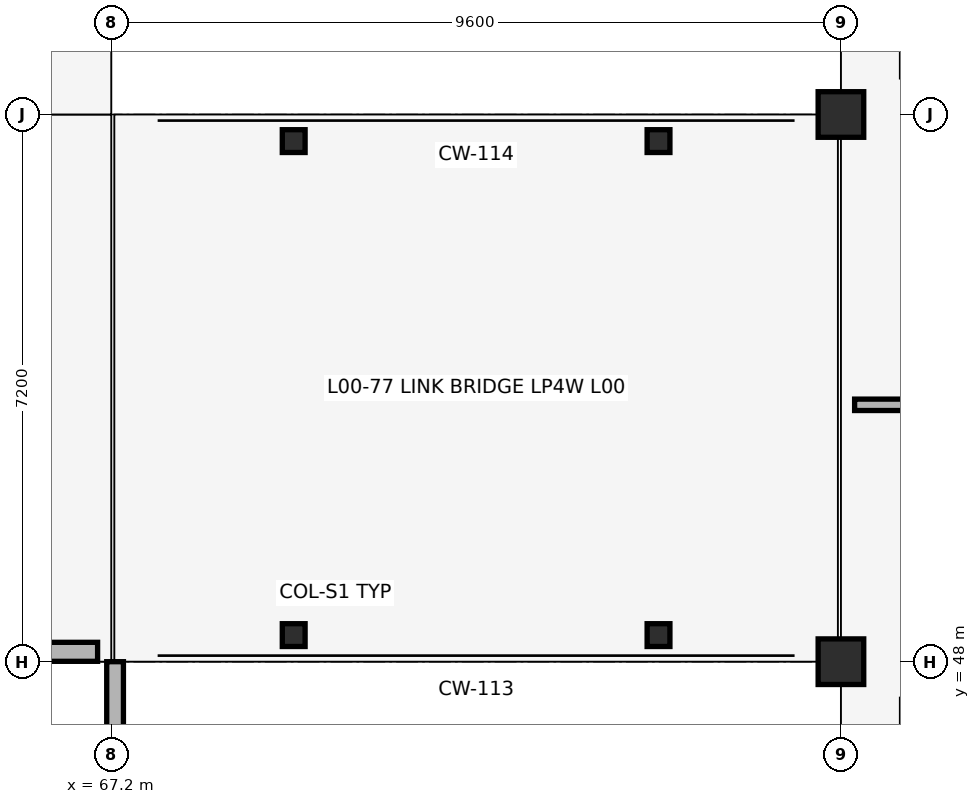
"""IFC4 building model, lengths in metres.
Left out: names, types, materials, properties, quantities, classifications, styles, units other than length and angle.
Written with IfcOpenShell. Run it as: python <this file> out.ifc"""

import sys

from ifc_helpers import new_model, si_unit, direction, frame, frame_2d, origin, origin_2d, place, context, subcontext, project, spatial, rectangle, circle, i_section, extrude, element, save


model = new_model("IFC4")
c1 = context("Model", 3, precision=1e-05, world=origin(), true_north=direction((0.0, 1.0)))
c2 = subcontext(c1, "Body", "Model", "MODEL_VIEW")
j1 = project(units=[si_unit("LENGTHUNIT", "METRE"), si_unit("PLANEANGLEUNIT", "RADIAN")], contexts=[c1])
p1 = place(None, origin())
s1 = spatial("IfcSite", under=j1, at=p1, CompositionType="ELEMENT")
p2 = place(p1, origin())
s2 = spatial("IfcBuilding", under=s1, at=p2, CompositionType="ELEMENT")
p3 = place(p2, origin())
s3 = spatial("IfcBuildingStorey", under=s2, at=p3, CompositionType="ELEMENT", Elevation=0.0)
for number, where, z_axis, x_axis in (
    (1, (69.6, 48.35, -0.44), (0.0, 0.0, 1.0), (1.0, 0.0, 0.0)),
    (2, (69.6, 54.85, -0.44), (0.0, 0.0, 1.0), (1.0, 0.0, 0.0)),
    (3, (74.4, 48.35, -0.44), (0.0, 0.0, 1.0), (1.0, 0.0, 0.0)),
    (4, (74.4, 54.85, -0.44), (0.0, 0.0, 1.0), (1.0, 0.0, 0.0)),
):
    element("IfcColumn", number, at=place(p3, frame(where, z_axis=z_axis, x_axis=x_axis)), inside=s3, PredefinedType="COLUMN", context=c2, shape_type="SweptSolid", body=[
        extrude(i_section(OverallWidth=0.3, OverallDepth=0.3, WebThickness=0.011, FlangeThickness=0.019, FilletRadius=0.027, at=origin_2d()), origin(), (0.0, 0.0, 1.0), 4.86),
    ])
for number, where, z_axis, x_axis in (
    (5, (76.8, 48.0, -0.44), (0.0, 0.0, 1.0), (1.0, 0.0, 0.0)),
    (6, (76.8, 55.2, -0.44), (0.0, 0.0, 1.0), (1.0, 0.0, 0.0)),
):
    element("IfcColumn", number, at=place(p3, frame(where, z_axis=z_axis, x_axis=x_axis)), inside=s3, PredefinedType="COLUMN", context=c2, shape_type="SweptSolid", body=[
        extrude(circle(Radius=0.3, at=origin_2d()), origin(), (0.0, 0.0, 1.0), 4.86),
    ])
p4 = place(p3, frame((57.68, 48.13, 0.0), z_axis=(0.0, 0.0, 1.0), x_axis=(1.0, 0.0, 0.0)))
e7 = element("IfcWall", 7, at=p4, inside=s3, PredefinedType="PARAPET", context=c2, shape_type="SweptSolid", body=[
    extrude(rectangle(XDim=9.34, YDim=0.25, at=frame_2d((4.67, 0.0))), origin(), (0.0, 0.0, 1.0), 1.12),
])
p5 = place(p3, frame((67.25, 7.2, 0.0), z_axis=(0.0, 0.0, 1.0), x_axis=(0.0, 1.0, 0.0)))
e8 = element("IfcWall", 8, at=p5, inside=s3, PredefinedType="PARAPET", context=c2, shape_type="SweptSolid", body=[
    extrude(rectangle(XDim=40.8, YDim=0.22, at=frame_2d((20.4, 0.0))), origin(), (0.0, 0.0, 1.0), 1.12),
])
p6 = place(p3, frame((76.98, 51.38, 0.0), z_axis=(0.0, 0.0, 1.0), x_axis=(1.0, 0.0, 0.0)))
e9 = element("IfcWall", 9, at=p6, inside=s3, PredefinedType="PARTITIONING", context=c2, shape_type="SweptSolid", body=[
    extrude(rectangle(XDim=18.84, YDim=0.15, at=frame_2d((9.42, 0.0))), origin(), (0.0, 0.0, 1.0), 3.46),
])
p7 = place(p6, frame((8.895, 0.0, 0.0)))
e10 = element("IfcOpeningElement", 10, at=p7, cuts=e9, PredefinedType="OPENING", context=c2, shape_type="SweptSolid", body=[
    extrude(rectangle(XDim=1.05, YDim=2.1, at=frame_2d((0.525, 1.05))), frame((0.0, 0.085, 0.0), z_axis=(0.0, -1.0, 0.0), x_axis=(1.0, 0.0, 0.0)), (0.0, 0.0, 1.0), 0.17),
])
save(model, sys.argv[1])
